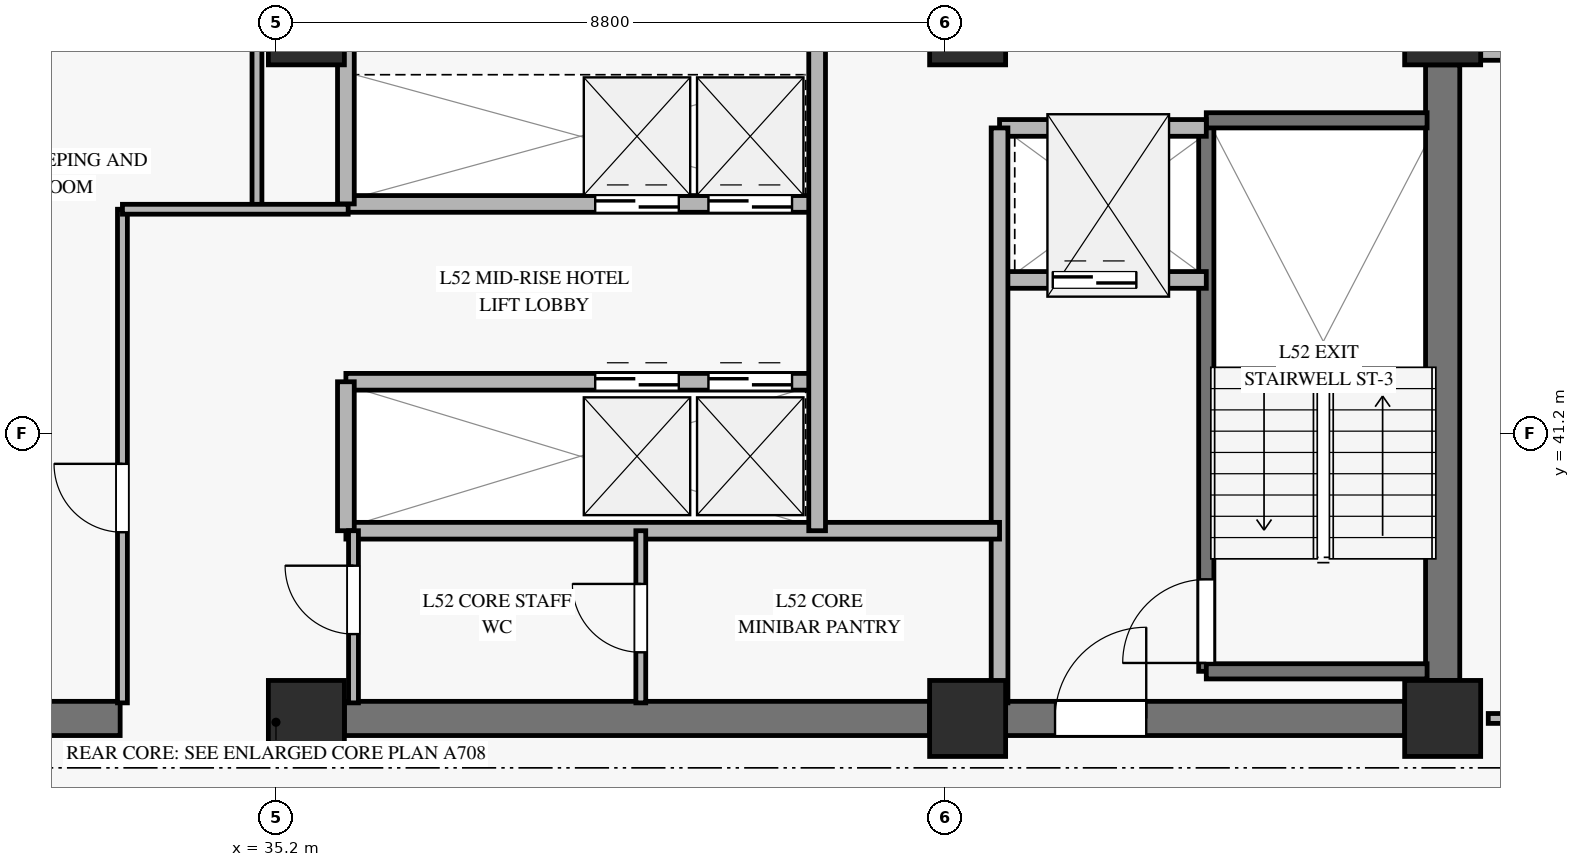
"""IFC4 building model, lengths in metres.
Left out: names, types, materials, properties, quantities, classifications, styles, units other than length and angle.
Written with IfcOpenShell. Run it as: python <this file> out.ifc"""

import sys

from ifc_helpers import new_model, si_unit, direction, frame, frame_2d, origin, origin_2d, place, context, subcontext, project, spatial, rectangle, extrude, source, transform, mapped, element, fill, save


model = new_model("IFC4")
c1 = context("Model", 3, precision=1e-05, world=origin(), true_north=direction((0.0, 1.0)))
c2 = subcontext(c1, "Body", "Model", "MODEL_VIEW")
j1 = project(units=[si_unit("LENGTHUNIT", "METRE"), si_unit("PLANEANGLEUNIT", "RADIAN")], contexts=[c1])
p1 = place(None, origin())
s1 = spatial("IfcSite", under=j1, at=p1, CompositionType="ELEMENT")
p2 = place(p1, origin())
s2 = spatial("IfcBuilding", under=s1, at=p2, CompositionType="ELEMENT")
p3 = place(p2, frame((0.0, 0.0, 206.2)))
s3 = spatial("IfcBuildingStorey", under=s2, at=p3, CompositionType="ELEMENT", Elevation=206.2)
m1 = source(origin(), c2, "Body", "SweptSolid", [
    extrude(rectangle(XDim=1.0, YDim=1.0, at=origin_2d()), origin(), (0.0, 0.0, 1.0), 3.27),
])
for number, where, z_axis, x_axis in (
    (1, (35.6, 37.45, 0.0), (0.0, 0.0, 1.0), (1.0, 0.0, 0.0)),
    (2, (35.6, 46.55, 0.0), (0.0, 0.0, 1.0), (1.0, 0.0, 0.0)),
    (3, (44.3, 37.45, 0.0), (0.0, 0.0, 1.0), (1.0, 0.0, 0.0)),
    (4, (44.3, 46.55, 0.0), (0.0, 0.0, 1.0), (1.0, 0.0, 0.0)),
    (5, (50.55, 37.45, 0.0), (0.0, 0.0, 1.0), (1.0, 0.0, 0.0)),
    (6, (50.55, 46.55, 0.0), (0.0, 0.0, 1.0), (1.0, 0.0, 0.0)),
):
    element("IfcColumn", number, at=place(p3, frame(where, z_axis=z_axis, x_axis=x_axis)), inside=s3, PredefinedType="PILASTER", context=c2, shape_type="MappedRepresentation", body=[
        mapped(m1, transform((0.0, 0.0, 0.0), x_axis=(1.0, 0.0, 0.0), y_axis=(0.0, 1.0, 0.0), z_axis=(0.0, 0.0, 1.0), scale=1.0)),
    ])
p4 = place(p3, frame((31.3, 37.45, 0.0), z_axis=(0.0, 0.0, 1.0), x_axis=(1.0, 0.0, 0.0)))
e7 = element("IfcWall", 7, at=p4, inside=s3, PredefinedType="SHEAR", context=c2, shape_type="SweptSolid", body=[
    extrude(rectangle(XDim=1.85, YDim=0.45, at=frame_2d((0.925, 0.0))), origin(), (0.0, 0.0, 1.0), 3.27),
])
p5 = place(p3, frame((36.1, 37.45, 0.0), z_axis=(0.0, 0.0, 1.0), x_axis=(1.0, 0.0, 0.0)))
e8 = element("IfcWall", 8, at=p5, inside=s3, PredefinedType="SHEAR", context=c2, shape_type="SweptSolid", body=[
    extrude(rectangle(XDim=7.7, YDim=0.45, at=frame_2d((3.85, 0.0))), origin(), (0.0, 0.0, 1.0), 3.27),
])
p6 = place(p3, frame((44.8, 37.45, 0.0), z_axis=(0.0, 0.0, 1.0), x_axis=(1.0, 0.0, 0.0)))
e9 = element("IfcWall", 9, at=p6, inside=s3, PredefinedType="SHEAR", context=c2, shape_type="SweptSolid", body=[
    extrude(rectangle(XDim=5.25, YDim=0.45, at=frame_2d((2.625, 0.0))), origin(), (0.0, 0.0, 1.0), 3.27),
])
p7 = place(p6, frame((0.65, 0.0, 0.0)))
e10 = element("IfcOpeningElement", 10, at=p7, cuts=e9, PredefinedType="OPENING", context=c2, shape_type="SweptSolid", body=[
    extrude(rectangle(XDim=1.2, YDim=2.15, at=frame_2d((0.6, 1.075))), frame((0.0, 0.235, 0.0), z_axis=(0.0, -1.0, 0.0), x_axis=(1.0, 0.0, 0.0)), (0.0, 0.0, 1.0), 0.47),
])
p8 = place(p3, frame((50.55, 37.95, 0.0), z_axis=(0.0, 0.0, 1.0), x_axis=(0.0, 1.0, 0.0)))
e11 = element("IfcWall", 11, at=p8, inside=s3, PredefinedType="SHEAR", context=c2, shape_type="SweptSolid", body=[
    extrude(rectangle(XDim=8.1, YDim=0.45, at=frame_2d((4.05, 0.0))), origin(), (0.0, 0.0, 1.0), 3.27),
])
p9 = place(p3, frame((51.05, 46.25, 0.0), z_axis=(0.0, 0.0, 1.0), x_axis=(1.0, 0.0, 0.0)))
e12 = element("IfcWall", 12, at=p9, inside=s3, PredefinedType="SOLIDWALL", context=c2, shape_type="SweptSolid", body=[
    extrude(rectangle(XDim=9.548, YDim=0.28, at=frame_2d((4.774, 0.0))), origin(), (0.0, 0.0, 1.0), 2.75),
])
p10 = place(p9, frame((3.974, 0.0, 0.45)))
e13 = element("IfcOpeningElement", 13, at=p10, cuts=e12, PredefinedType="OPENING", context=c2, shape_type="SweptSolid", body=[
    extrude(rectangle(XDim=1.6, YDim=2.0, at=frame_2d((0.8, 1.0))), frame((0.0, 0.15, 0.0), z_axis=(0.0, -1.0, 0.0), x_axis=(1.0, 0.0, 0.0)), (0.0, 0.0, 1.0), 0.3),
])
p11 = place(p3, frame((47.44, 38.07, 0.0), z_axis=(0.0, 0.0, 1.0), x_axis=(0.0, 1.0, 0.0)))
e14 = element("IfcWall", 14, at=p11, inside=s3, PredefinedType="SOLIDWALL", context=c2, shape_type="SweptSolid", body=[
    extrude(rectangle(XDim=7.25, YDim=0.2, at=frame_2d((3.625, 0.0))), origin(), (0.0, 0.0, 1.0), 3.5),
])
p12 = place(p11, frame((0.11, 0.0, 0.0)))
e15 = element("IfcOpeningElement", 15, at=p12, cuts=e14, PredefinedType="OPENING", context=c2, shape_type="SweptSolid", body=[
    extrude(rectangle(XDim=1.1, YDim=2.15, at=frame_2d((0.55, 1.075))), frame((0.0, 0.11, 0.0), z_axis=(0.0, -1.0, 0.0), x_axis=(1.0, 0.0, 0.0)), (0.0, 0.0, 1.0), 0.22),
])
for number, where, z_axis, x_axis in (
    (16, (47.44, 45.32, 0.0), (0.0, 0.0, 1.0), (1.0, 0.0, 0.0)),
    (17, (47.44, 38.07, 0.0), (0.0, 0.0, 1.0), (1.0, 0.0, 0.0)),
):
    element("IfcWall", number, at=place(p3, frame(where, z_axis=z_axis, x_axis=x_axis)), inside=s3, PredefinedType="SOLIDWALL", context=c2, shape_type="SweptSolid", body=[
        extrude(rectangle(XDim=2.905, YDim=0.2, at=frame_2d((1.453, 0.0))), origin(), (0.0, 0.0, 1.0), 3.5),
    ])
p13 = place(p3, frame((44.72, 43.22, 0.0), z_axis=(0.0, 0.0, 1.0), x_axis=(1.0, 0.0, 0.0)))
e18 = element("IfcWall", 18, at=p13, inside=s3, PredefinedType="SOLIDWALL", context=c2, shape_type="SweptSolid", body=[
    extrude(rectangle(XDim=2.72, YDim=0.22, at=frame_2d((1.36, 0.0))), origin(), (0.0, 0.0, 1.0), 3.27),
])
p14 = place(p13, frame((0.7, 0.0, 0.0)))
e19 = element("IfcOpeningElement", 19, at=p14, cuts=e18, PredefinedType="OPENING", context=c2, shape_type="SweptSolid", body=[
    extrude(rectangle(XDim=1.1, YDim=2.2, at=frame_2d((0.55, 1.1))), frame((0.0, 0.12, 0.0), z_axis=(0.0, -1.0, 0.0), x_axis=(1.0, 0.0, 0.0)), (0.0, 0.0, 1.0), 0.24),
])
p15 = place(p3, frame((44.72, 45.22, 0.0), z_axis=(0.0, 0.0, 1.0), x_axis=(1.0, 0.0, 0.0)))
e20 = element("IfcWall", 20, at=p15, inside=s3, PredefinedType="SOLIDWALL", context=c2, shape_type="SweptSolid", body=[
    extrude(rectangle(XDim=2.72, YDim=0.22, at=frame_2d((1.36, 0.0))), origin(), (0.0, 0.0, 1.0), 3.27),
])
p16 = place(p3, frame((44.72, 37.655, 0.0), z_axis=(0.0, 0.0, 1.0), x_axis=(0.0, 1.0, 0.0)))
e21 = element("IfcWall", 21, at=p16, inside=s3, PredefinedType="SOLIDWALL", context=c2, shape_type="SweptSolid", body=[
    extrude(rectangle(XDim=7.565, YDim=0.22, at=frame_2d((3.782, 0.0))), origin(), (0.0, 0.0, 1.0), 3.27),
])
p17 = place(p3, frame((36.12, 44.22, 0.0), z_axis=(0.0, 0.0, 1.0), x_axis=(1.0, 0.0, 0.0)))
e22 = element("IfcWall", 22, at=p17, inside=s3, PredefinedType="SOLIDWALL", context=c2, shape_type="SweptSolid", body=[
    extrude(rectangle(XDim=6.2, YDim=0.22, at=frame_2d((3.1, 0.0))), origin(), (0.0, 0.0, 1.0), 3.27),
])
p18 = place(p17, frame((3.28, 0.0, 0.0)))
e23 = element("IfcOpeningElement", 23, at=p18, cuts=e22, PredefinedType="OPENING", context=c2, shape_type="SweptSolid", body=[
    extrude(rectangle(XDim=1.1, YDim=2.2, at=frame_2d((0.55, 1.1))), frame((0.0, 0.12, 0.0), z_axis=(0.0, -1.0, 0.0), x_axis=(1.0, 0.0, 0.0)), (0.0, 0.0, 1.0), 0.24),
])
p19 = place(p17, frame((4.77, 0.0, 0.0)))
e24 = element("IfcOpeningElement", 24, at=p19, cuts=e22, PredefinedType="OPENING", context=c2, shape_type="SweptSolid", body=[
    extrude(rectangle(XDim=1.1, YDim=2.2, at=frame_2d((0.55, 1.1))), frame((0.0, 0.12, 0.0), z_axis=(0.0, -1.0, 0.0), x_axis=(1.0, 0.0, 0.0)), (0.0, 0.0, 1.0), 0.24),
])
p20 = place(p3, frame((36.12, 41.88, 0.0), z_axis=(0.0, 0.0, 1.0), x_axis=(1.0, 0.0, 0.0)))
e25 = element("IfcWall", 25, at=p20, inside=s3, PredefinedType="SOLIDWALL", context=c2, shape_type="SweptSolid", body=[
    extrude(rectangle(XDim=6.2, YDim=0.22, at=frame_2d((3.1, 0.0))), origin(), (0.0, 0.0, 1.0), 3.27),
])
p21 = place(p20, frame((3.28, 0.0, 0.0)))
e26 = element("IfcOpeningElement", 26, at=p21, cuts=e25, PredefinedType="OPENING", context=c2, shape_type="SweptSolid", body=[
    extrude(rectangle(XDim=1.1, YDim=2.2, at=frame_2d((0.55, 1.1))), frame((0.0, 0.12, 0.0), z_axis=(0.0, -1.0, 0.0), x_axis=(1.0, 0.0, 0.0)), (0.0, 0.0, 1.0), 0.24),
])
p22 = place(p20, frame((4.77, 0.0, 0.0)))
e27 = element("IfcOpeningElement", 27, at=p22, cuts=e25, PredefinedType="OPENING", context=c2, shape_type="SweptSolid", body=[
    extrude(rectangle(XDim=1.1, YDim=2.2, at=frame_2d((0.55, 1.1))), frame((0.0, 0.12, 0.0), z_axis=(0.0, -1.0, 0.0), x_axis=(1.0, 0.0, 0.0)), (0.0, 0.0, 1.0), 0.24),
])
p23 = place(p3, frame((36.12, 39.92, 0.0), z_axis=(0.0, 0.0, 1.0), x_axis=(1.0, 0.0, 0.0)))
e28 = element("IfcWall", 28, at=p23, inside=s3, PredefinedType="SOLIDWALL", context=c2, shape_type="SweptSolid", body=[
    extrude(rectangle(XDim=8.6, YDim=0.22, at=frame_2d((4.3, 0.0))), origin(), (0.0, 0.0, 1.0), 2.555),
])
p24 = place(p3, frame((42.32, 39.92, 0.0), z_axis=(0.0, 0.0, 1.0), x_axis=(0.0, 1.0, 0.0)))
e29 = element("IfcWall", 29, at=p24, inside=s3, PredefinedType="SOLIDWALL", context=c2, shape_type="SweptSolid", body=[
    extrude(rectangle(XDim=6.425, YDim=0.22, at=frame_2d((3.212, 0.0))), origin(), (0.0, 0.0, 1.0), 3.27),
])
p25 = place(p3, frame((36.12, 39.92, 0.0), z_axis=(0.0, 0.0, 1.0), x_axis=(0.0, 1.0, 0.0)))
e30 = element("IfcWall", 30, at=p25, inside=s3, PredefinedType="SOLIDWALL", context=c2, shape_type="SweptSolid", body=[
    extrude(rectangle(XDim=1.96, YDim=0.22, at=frame_2d((0.98, 0.0))), origin(), (0.0, 0.0, 1.0), 3.27),
])
p26 = place(p3, frame((36.12, 44.22, 0.0), z_axis=(0.0, 0.0, 1.0), x_axis=(0.0, 1.0, 0.0)))
e31 = element("IfcWall", 31, at=p26, inside=s3, PredefinedType="SOLIDWALL", context=c2, shape_type="SweptSolid", body=[
    extrude(rectangle(XDim=2.125, YDim=0.22, at=frame_2d((1.062, 0.0))), origin(), (0.0, 0.0, 1.0), 3.27),
])
p27 = place(p3, frame((33.18, 37.655, 0.0), z_axis=(0.0, 0.0, 1.0), x_axis=(0.0, 1.0, 0.0)))
e32 = element("IfcWall", 32, at=p27, inside=s3, PredefinedType="PARTITIONING", context=c2, shape_type="SweptSolid", body=[
    extrude(rectangle(XDim=6.495, YDim=0.13, at=frame_2d((3.248, 0.0))), origin(), (0.0, 0.0, 1.0), 2.355),
])
p28 = place(p27, frame((2.245, 0.0, 0.0)))
e33 = element("IfcOpeningElement", 33, at=p28, cuts=e32, PredefinedType="OPENING", context=c2, shape_type="SweptSolid", body=[
    extrude(rectangle(XDim=0.9, YDim=2.1, at=frame_2d((0.45, 1.05))), frame((0.0, 0.075, 0.0), z_axis=(0.0, -1.0, 0.0), x_axis=(1.0, 0.0, 0.0)), (0.0, 0.0, 1.0), 0.15),
])
p29 = place(p3, frame((34.95, 44.15, 0.0), z_axis=(0.0, 0.0, 1.0), x_axis=(0.0, 1.0, 0.0)))
e34 = element("IfcWall", 34, at=p29, inside=s3, PredefinedType="PARTITIONING", context=c2, shape_type="SweptSolid", body=[
    extrude(rectangle(XDim=2.195, YDim=0.13, at=frame_2d((1.098, 0.0))), origin(), (0.0, 0.0, 1.0), 3.27),
])
p30 = place(p3, frame((33.18, 44.15, 0.0), z_axis=(0.0, 0.0, 1.0), x_axis=(1.0, 0.0, 0.0)))
e35 = element("IfcWall", 35, at=p30, inside=s3, PredefinedType="PARTITIONING", context=c2, shape_type="SweptSolid", body=[
    extrude(rectangle(XDim=2.97, YDim=0.13, at=frame_2d((1.485, 0.0))), origin(), (0.0, 0.0, 1.0), 2.555),
])
p31 = place(p3, frame((36.22, 37.655, 0.0), z_axis=(0.0, 0.0, 1.0), x_axis=(0.0, 1.0, 0.0)))
e36 = element("IfcWall", 36, at=p31, inside=s3, PredefinedType="PARTITIONING", context=c2, shape_type="SweptSolid", body=[
    extrude(rectangle(XDim=2.265, YDim=0.13, at=frame_2d((1.132, 0.0))), origin(), (0.0, 0.0, 1.0), 3.27),
])
p32 = place(p31, frame((0.905, 0.0, 0.0)))
e37 = element("IfcOpeningElement", 37, at=p32, cuts=e36, PredefinedType="OPENING", context=c2, shape_type="SweptSolid", body=[
    extrude(rectangle(XDim=0.9, YDim=2.1, at=frame_2d((0.45, 1.05))), frame((0.0, 0.075, 0.0), z_axis=(0.0, -1.0, 0.0), x_axis=(1.0, 0.0, 0.0)), (0.0, 0.0, 1.0), 0.15),
])
p33 = place(p3, frame((40.0, 37.655, 0.0), z_axis=(0.0, 0.0, 1.0), x_axis=(0.0, 1.0, 0.0)))
e38 = element("IfcWall", 38, at=p33, inside=s3, PredefinedType="PARTITIONING", context=c2, shape_type="SweptSolid", body=[
    extrude(rectangle(XDim=2.265, YDim=0.13, at=frame_2d((1.132, 0.0))), origin(), (0.0, 0.0, 1.0), 3.27),
])
p34 = place(p33, frame((0.665, 0.0, 0.0)))
e39 = element("IfcOpeningElement", 39, at=p34, cuts=e38, PredefinedType="OPENING", context=c2, shape_type="SweptSolid", body=[
    extrude(rectangle(XDim=0.9, YDim=2.1, at=frame_2d((0.45, 1.05))), frame((0.0, 0.075, 0.0), z_axis=(0.0, -1.0, 0.0), x_axis=(1.0, 0.0, 0.0)), (0.0, 0.0, 1.0), 0.15),
])
p35 = place(p3, frame((51.15, 37.45, 0.0), z_axis=(0.0, 0.0, 1.0), x_axis=(1.0, 0.0, 0.0)))
e40 = element("IfcWall", 40, at=p35, inside=s3, PredefinedType="PARTITIONING", context=c2, shape_type="SweptSolid", body=[
    extrude(rectangle(XDim=12.548, YDim=0.13, at=frame_2d((6.274, 0.0))), origin(), (0.0, 0.0, 1.0), 2.755),
])
p36 = place(p35, frame((0.5, 0.0, 0.0)))
e41 = element("IfcOpeningElement", 41, at=p36, cuts=e40, PredefinedType="OPENING", context=c2, shape_type="SweptSolid", body=[
    extrude(rectangle(XDim=0.9, YDim=2.1, at=frame_2d((0.45, 1.05))), frame((0.0, 0.075, 0.0), z_axis=(0.0, -1.0, 0.0), x_axis=(1.0, 0.0, 0.0)), (0.0, 0.0, 1.0), 0.15),
])
p37 = place(p35, frame((9.224, 0.0, 0.0)))
e42 = element("IfcOpeningElement", 42, at=p37, cuts=e40, PredefinedType="OPENING", context=c2, shape_type="SweptSolid", body=[
    extrude(rectangle(XDim=0.95, YDim=2.1, at=frame_2d((0.475, 1.05))), frame((0.0, 0.075, 0.0), z_axis=(0.0, -1.0, 0.0), x_axis=(1.0, 0.0, 0.0)), (0.0, 0.0, 1.0), 0.15),
])
m2 = source(origin(), c2, "Body", "SweptSolid", [
    extrude(rectangle(XDim=1.1, YDim=2.15, at=frame_2d((0.55, 1.075))), frame((0.0, 0.025, 0.0), z_axis=(0.0, -1.0, 0.0), x_axis=(1.0, 0.0, 0.0)), (0.0, 0.0, 1.0), 0.05),
])
p38 = place(p12, origin())
e43 = element("IfcDoor", 43, at=p38, inside=s3, OperationType="SINGLE_SWING_LEFT", PredefinedType="DOOR", context=c2, shape_type="MappedRepresentation", body=[
    mapped(m2, transform((0.0, 0.0, 0.0), x_axis=(1.0, 0.0, 0.0), y_axis=(0.0, 1.0, 0.0), z_axis=(0.0, 0.0, 1.0), scale=1.0)),
])
fill(e15, e43)
m3 = source(origin(), c2, "Body", "SweptSolid", [
    extrude(rectangle(XDim=1.1, YDim=2.2, at=frame_2d((0.55, 1.1))), frame((0.0, 0.025, 0.0), z_axis=(0.0, -1.0, 0.0), x_axis=(1.0, 0.0, 0.0)), (0.0, 0.0, 1.0), 0.05),
])
p39 = place(p14, origin())
e44 = element("IfcDoor", 44, at=p39, inside=s3, OperationType="SLIDING_TO_LEFT", PredefinedType="DOOR", context=c2, shape_type="MappedRepresentation", body=[
    mapped(m3, transform((0.0, 0.0, 0.0), x_axis=(1.0, 0.0, 0.0), y_axis=(0.0, 1.0, 0.0), z_axis=(0.0, 0.0, 1.0), scale=1.0)),
])
fill(e19, e44)
m4 = source(origin(), c2, "Body", "SweptSolid", [
    extrude(rectangle(XDim=1.2, YDim=2.15, at=frame_2d((0.6, 1.075))), frame((0.0, 0.025, 0.0), z_axis=(0.0, -1.0, 0.0), x_axis=(1.0, 0.0, 0.0)), (0.0, 0.0, 1.0), 0.05),
])
p40 = place(p7, origin())
e45 = element("IfcDoor", 45, at=p40, inside=s3, OperationType="SINGLE_SWING_RIGHT", PredefinedType="DOOR", context=c2, shape_type="MappedRepresentation", body=[
    mapped(m4, transform((0.0, 0.0, 0.0), x_axis=(1.0, 0.0, 0.0), y_axis=(0.0, 1.0, 0.0), z_axis=(0.0, 0.0, 1.0), scale=1.0)),
])
fill(e10, e45)
p41 = place(p18, origin())
e46 = element("IfcDoor", 46, at=p41, inside=s3, OperationType="SLIDING_TO_LEFT", PredefinedType="DOOR", context=c2, shape_type="MappedRepresentation", body=[
    mapped(m3, transform((0.0, 0.0, 0.0), x_axis=(1.0, 0.0, 0.0), y_axis=(0.0, 1.0, 0.0), z_axis=(0.0, 0.0, 1.0), scale=1.0)),
])
fill(e23, e46)
p42 = place(p19, origin())
e47 = element("IfcDoor", 47, at=p42, inside=s3, OperationType="SLIDING_TO_LEFT", PredefinedType="DOOR", context=c2, shape_type="MappedRepresentation", body=[
    mapped(m3, transform((0.0, 0.0, 0.0), x_axis=(1.0, 0.0, 0.0), y_axis=(0.0, 1.0, 0.0), z_axis=(0.0, 0.0, 1.0), scale=1.0)),
])
fill(e24, e47)
p43 = place(p21, origin())
e48 = element("IfcDoor", 48, at=p43, inside=s3, OperationType="SLIDING_TO_LEFT", PredefinedType="DOOR", context=c2, shape_type="MappedRepresentation", body=[
    mapped(m3, transform((0.0, 0.0, 0.0), x_axis=(1.0, 0.0, 0.0), y_axis=(0.0, 1.0, 0.0), z_axis=(0.0, 0.0, 1.0), scale=1.0)),
])
fill(e26, e48)
p44 = place(p22, origin())
e49 = element("IfcDoor", 49, at=p44, inside=s3, OperationType="SLIDING_TO_LEFT", PredefinedType="DOOR", context=c2, shape_type="MappedRepresentation", body=[
    mapped(m3, transform((0.0, 0.0, 0.0), x_axis=(1.0, 0.0, 0.0), y_axis=(0.0, 1.0, 0.0), z_axis=(0.0, 0.0, 1.0), scale=1.0)),
])
fill(e27, e49)
m5 = source(origin(), c2, "Body", "SweptSolid", [
    extrude(rectangle(XDim=0.9, YDim=2.1, at=frame_2d((0.45, 1.05))), frame((0.0, 0.025, 0.0), z_axis=(0.0, -1.0, 0.0), x_axis=(1.0, 0.0, 0.0)), (0.0, 0.0, 1.0), 0.05),
])
p45 = place(p28, origin())
e50 = element("IfcDoor", 50, at=p45, inside=s3, OperationType="SINGLE_SWING_RIGHT", PredefinedType="DOOR", context=c2, shape_type="MappedRepresentation", body=[
    mapped(m5, transform((0.0, 0.0, 0.0), x_axis=(1.0, 0.0, 0.0), y_axis=(0.0, 1.0, 0.0), z_axis=(0.0, 0.0, 1.0), scale=1.0)),
])
fill(e33, e50)
p46 = place(p32, origin())
e51 = element("IfcDoor", 51, at=p46, inside=s3, OperationType="SINGLE_SWING_RIGHT", PredefinedType="DOOR", context=c2, shape_type="MappedRepresentation", body=[
    mapped(m5, transform((0.0, 0.0, 0.0), x_axis=(1.0, 0.0, 0.0), y_axis=(0.0, 1.0, 0.0), z_axis=(0.0, 0.0, 1.0), scale=1.0)),
])
fill(e37, e51)
p47 = place(p34, origin())
e52 = element("IfcDoor", 52, at=p47, inside=s3, OperationType="SINGLE_SWING_RIGHT", PredefinedType="DOOR", context=c2, shape_type="MappedRepresentation", body=[
    mapped(m5, transform((0.0, 0.0, 0.0), x_axis=(1.0, 0.0, 0.0), y_axis=(0.0, 1.0, 0.0), z_axis=(0.0, 0.0, 1.0), scale=1.0)),
])
fill(e39, e52)
save(model, sys.argv[1])
